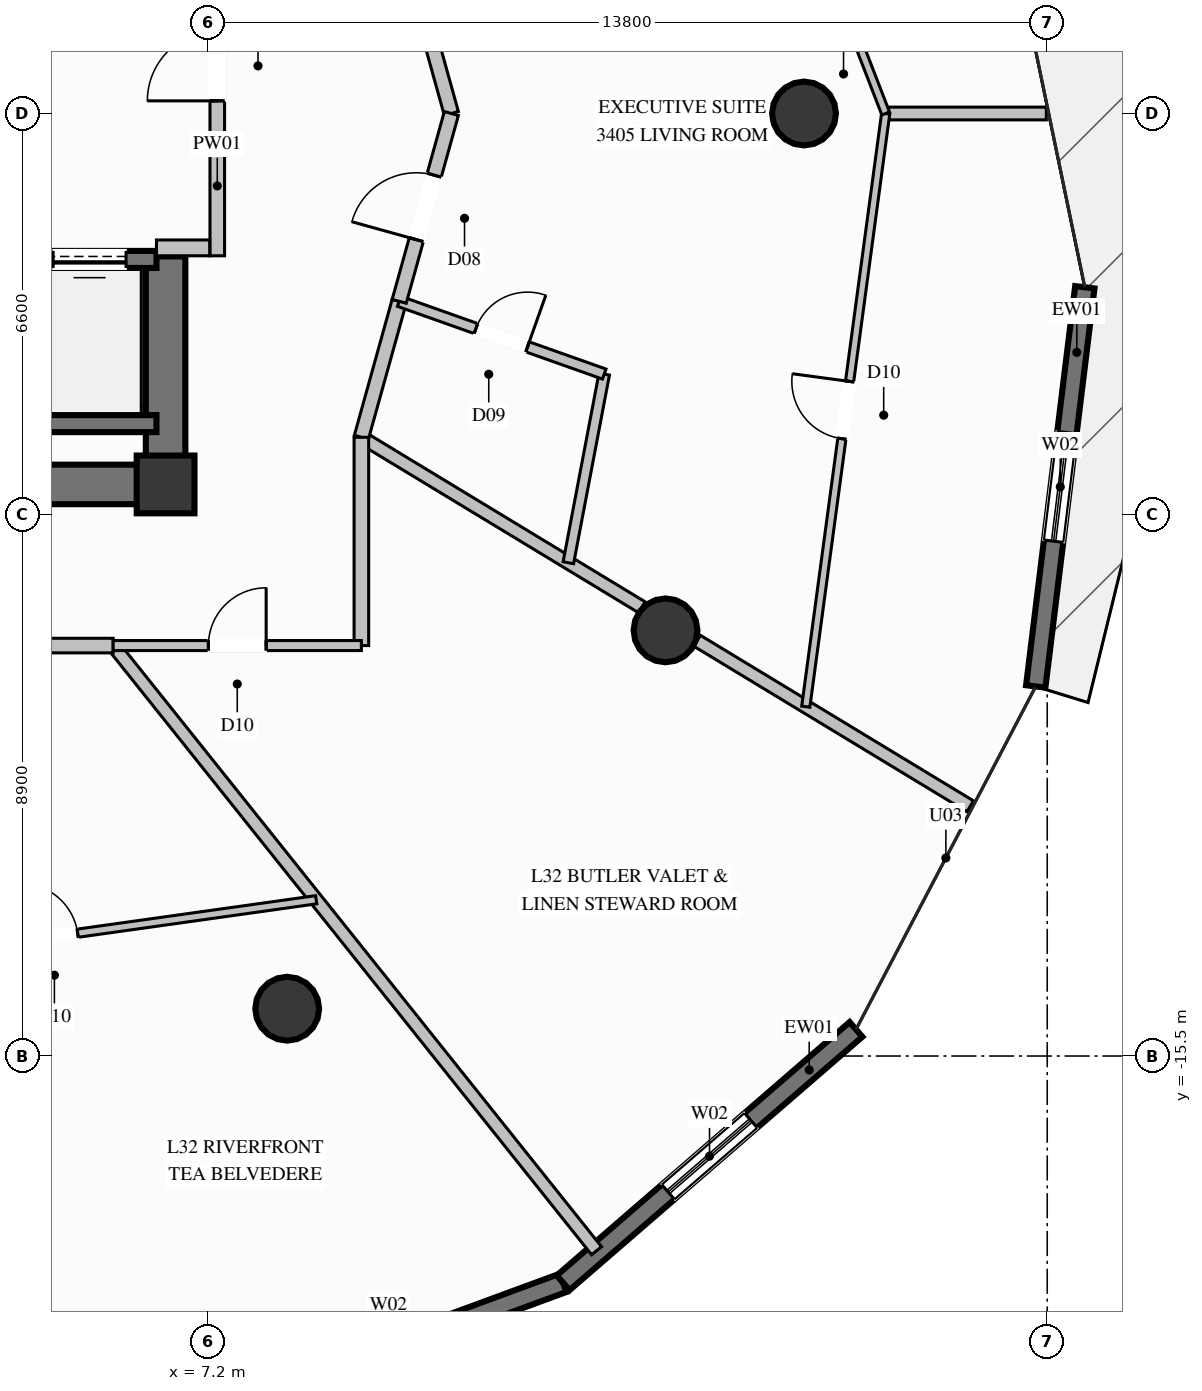
"""IFC4 building model, lengths in metres.
Left out: names, types, materials, properties, quantities, classifications, styles, units other than length and angle.
Written with IfcOpenShell. Run it as: python <this file> out.ifc"""

import sys

from ifc_helpers import new_model, si_unit, direction, frame, frame_2d, origin, origin_2d, place, context, subcontext, project, spatial, rectangle, circle, extrude, element, fill, save


model = new_model("IFC4")
c1 = context("Model", 3, precision=1e-05, world=origin(), true_north=direction((0.0, 1.0)))
c2 = subcontext(c1, "Body", "Model", "MODEL_VIEW")
j1 = project(units=[si_unit("LENGTHUNIT", "METRE"), si_unit("PLANEANGLEUNIT", "RADIAN")], contexts=[c1])
p1 = place(None, origin())
s1 = spatial("IfcSite", under=j1, at=p1, CompositionType="ELEMENT")
p2 = place(p1, origin())
s2 = spatial("IfcBuilding", under=s1, at=p2, CompositionType="ELEMENT")
p3 = place(p2, frame((0.0, 0.0, 127.8)))
s3 = spatial("IfcBuildingStorey", under=s2, at=p3, CompositionType="ELEMENT", Elevation=127.8)
p4 = place(p3, frame((6.5, -6.1, 0.0), z_axis=(0.0, 0.0, 1.0), x_axis=(1.0, 0.0, 0.0)))
e1 = element("IfcColumn", 1, at=p4, inside=s3, PredefinedType="COLUMN", context=c2, shape_type="SweptSolid", body=[
    extrude(rectangle(XDim=0.95, YDim=0.95, at=origin_2d()), origin(), (0.0, 0.0, 1.0), 3.6),
])
p5 = place(p3, frame((4.15, -6.1, 0.0), z_axis=(0.0, 0.0, 1.0), x_axis=(1.0, 0.0, 0.0)))
e2 = element("IfcWall", 2, at=p5, inside=s3, PredefinedType="SHEAR", context=c2, shape_type="SweptSolid", body=[
    extrude(rectangle(XDim=2.025, YDim=0.65, at=frame_2d((1.013, 0.0))), origin(), (0.0, 0.0, 1.0), 3.6),
])
p6 = place(p3, frame((6.5, -6.425, 0.0), z_axis=(0.0, 0.0, 1.0), x_axis=(0.0, 1.0, 0.0)))
e3 = element("IfcWall", 3, at=p6, inside=s3, PredefinedType="SHEAR", context=c2, shape_type="SweptSolid", body=[
    extrude(rectangle(XDim=4.075, YDim=0.65, at=frame_2d((2.038, 0.0))), origin(), (0.0, 0.0, 1.0), 3.6),
])
for number, where, z_axis, x_axis in (
    (4, (17.0, 0.0, 0.0), (0.0, 0.0, 1.0), (1.0, 0.0, 0.0)),
    (5, (8.5, -14.722, 0.0), (0.0, 0.0, 1.0), (1.0, 0.0, 0.0)),
    (6, (14.722, -8.5, 0.0), (0.0, 0.0, 1.0), (1.0, 0.0, 0.0)),
):
    element("IfcColumn", number, at=place(p3, frame(where, z_axis=z_axis, x_axis=x_axis)), inside=s3, PredefinedType="COLUMN", context=c2, shape_type="SweptSolid", body=[
        extrude(circle(Radius=0.525, at=origin_2d()), origin(), (0.0, 0.0, 1.0), 3.6),
    ])
p7 = place(p3, frame((21.618, -2.858, 0.0), z_axis=(0.0, 0.0, 1.0), x_axis=(-0.122003589953, -0.992529659022, 0.0)))
e7 = element("IfcWall", 7, at=p7, inside=s3, PredefinedType="SOLIDWALL", context=c2, shape_type="SweptSolid", body=[
    extrude(rectangle(XDim=6.614, YDim=0.32, at=frame_2d((3.307, 0.0))), origin(), (0.0, 0.0, 1.0), 3.35),
])
p8 = place(p7, frame((2.407, 0.0, 0.35)))
e8 = element("IfcOpeningElement", 8, at=p8, cuts=e7, PredefinedType="OPENING", context=c2, shape_type="SweptSolid", body=[
    extrude(rectangle(XDim=1.8, YDim=2.6, at=frame_2d((0.9, 1.3))), frame((0.0, 0.17, 0.0), z_axis=(0.0, -1.0, 0.0), x_axis=(1.0, 0.0, 0.0)), (0.0, 0.0, 1.0), 0.34),
])
p9 = place(p3, frame((13.038, -19.23, 0.0), z_axis=(0.0, 0.0, 1.0), x_axis=(-0.938465968801, -0.345371720619, 0.0)))
e9 = element("IfcWall", 9, at=p9, inside=s3, PredefinedType="SOLIDWALL", context=c2, shape_type="SweptSolid", body=[
    extrude(rectangle(XDim=6.613, YDim=0.32, at=frame_2d((3.307, 0.0))), origin(), (0.0, 0.0, 1.0), 3.35),
])
p10 = place(p9, frame((2.162, 0.0, 0.35)))
e10 = element("IfcOpeningElement", 10, at=p10, cuts=e9, PredefinedType="OPENING", context=c2, shape_type="SweptSolid", body=[
    extrude(rectangle(XDim=1.8, YDim=2.6, at=frame_2d((0.9, 1.3))), frame((0.0, 0.17, 0.0), z_axis=(0.0, -1.0, 0.0), x_axis=(1.0, 0.0, 0.0)), (0.0, 0.0, 1.0), 0.34),
])
p11 = place(p3, frame((17.855, -15.063, 0.0), z_axis=(0.0, 0.0, 1.0), x_axis=(-0.75628320377, -0.654244385299, 0.0)))
e11 = element("IfcWall", 11, at=p11, inside=s3, PredefinedType="SOLIDWALL", context=c2, shape_type="SweptSolid", body=[
    extrude(rectangle(XDim=6.369, YDim=0.32, at=frame_2d((3.185, 0.0))), origin(), (0.0, 0.0, 1.0), 3.35),
])
p12 = place(p11, frame((2.286, 0.0, 0.35)))
e12 = element("IfcOpeningElement", 12, at=p12, cuts=e11, PredefinedType="OPENING", context=c2, shape_type="SweptSolid", body=[
    extrude(rectangle(XDim=1.8, YDim=2.6, at=frame_2d((0.9, 1.3))), frame((0.0, 0.17, 0.0), z_axis=(0.0, -1.0, 0.0), x_axis=(1.0, 0.0, 0.0)), (0.0, 0.0, 1.0), 0.34),
])
p13 = place(p3, frame((4.15, -5.1, 0.0), z_axis=(0.0, 0.0, 1.0), x_axis=(1.0, 0.0, 0.0)))
e13 = element("IfcWall", 13, at=p13, inside=s3, PredefinedType="SOLIDWALL", context=c2, shape_type="SweptSolid", body=[
    extrude(rectangle(XDim=2.2, YDim=0.28, at=frame_2d((1.1, 0.0))), origin(), (0.0, 0.0, 1.0), 3.35),
])
p14 = place(p3, frame((6.35, -2.4, 0.0), z_axis=(0.0, 0.0, 1.0), x_axis=(-1.0, 0.0, 0.0)))
e14 = element("IfcWall", 14, at=p14, inside=s3, PredefinedType="SOLIDWALL", context=c2, shape_type="SweptSolid", body=[
    extrude(rectangle(XDim=2.2, YDim=0.28, at=frame_2d((1.1, 0.0))), origin(), (0.0, 0.0, 1.0), 3.35),
])
p15 = place(p14, frame((0.5, 0.0, 0.0)))
e15 = element("IfcOpeningElement", 15, at=p15, cuts=e14, PredefinedType="OPENING", context=c2, shape_type="SweptSolid", body=[
    extrude(rectangle(XDim=1.2, YDim=2.2, at=frame_2d((0.6, 1.1))), frame((0.0, 0.15, 0.0), z_axis=(0.0, -1.0, 0.0), x_axis=(1.0, 0.0, 0.0)), (0.0, 0.0, 1.0), 0.3),
])
p16 = place(p3, frame((7.35, -2.34, 0.0), z_axis=(0.0, 0.0, 1.0), x_axis=(0.0, 1.0, 0.0)))
e16 = element("IfcWall", 16, at=p16, inside=s3, PredefinedType="PARTITIONING", context=c2, shape_type="SweptSolid", body=[
    extrude(rectangle(XDim=5.07, YDim=0.24, at=frame_2d((2.535, 0.0))), origin(), (0.0, 0.0, 1.0), 2.435),
])
p17 = place(p16, frame((2.548, 0.0, 0.0)))
e17 = element("IfcOpeningElement", 17, at=p17, cuts=e16, PredefinedType="OPENING", context=c2, shape_type="SweptSolid", body=[
    extrude(rectangle(XDim=1.15, YDim=2.2, at=frame_2d((0.575, 1.1))), frame((0.0, 0.13, 0.0), z_axis=(0.0, -1.0, 0.0), x_axis=(1.0, 0.0, 0.0)), (0.0, 0.0, 1.0), 0.26),
])
p18 = place(p3, frame((6.35, -2.21, 0.0), z_axis=(0.0, 0.0, 1.0), x_axis=(1.0, 0.0, 0.0)))
e18 = element("IfcWall", 18, at=p18, inside=s3, PredefinedType="PARTITIONING", context=c2, shape_type="SweptSolid", body=[
    extrude(rectangle(XDim=0.875, YDim=0.26, at=frame_2d((0.438, 0.0))), origin(), (0.0, 0.0, 1.0), 3.35),
])
p19 = place(p3, frame((9.72, -5.325, 0.0), z_axis=(0.0, 0.0, 1.0), x_axis=(0.855199655735, -0.518298706183, 0.0)))
e19 = element("IfcWall", 19, at=p19, inside=s3, PredefinedType="PARTITIONING", context=c2, shape_type="SweptSolid", body=[
    extrude(rectangle(XDim=5.393, YDim=0.21, at=frame_2d((2.697, 0.0))), origin(), (0.0, 0.0, 1.0), 2.717),
])
p20 = place(p3, frame((15.24, -8.67, 0.0), z_axis=(0.0, 0.0, 1.0), x_axis=(0.855184099406, -0.51832437346, 0.0)))
e20 = element("IfcWall", 20, at=p20, inside=s3, PredefinedType="PARTITIONING", context=c2, shape_type="SweptSolid", body=[
    extrude(rectangle(XDim=5.254, YDim=0.21, at=frame_2d((2.627, 0.0))), origin(), (0.0, 0.0, 1.0), 3.35),
])
p21 = place(p3, frame((9.72, -5.325, 0.0), z_axis=(0.0, 0.0, 1.0), x_axis=(0.268045342481, 0.963406297662, 0.0)))
e21 = element("IfcWall", 21, at=p21, inside=s3, PredefinedType="PARTITIONING", context=c2, shape_type="SweptSolid", body=[
    extrude(rectangle(XDim=2.321, YDim=0.24, at=frame_2d((1.16, 0.0))), origin(), (0.0, 0.0, 1.0), 3.35),
])
p22 = place(p3, frame((13.124, -7.388, 0.0), z_axis=(0.0, 0.0, 1.0), x_axis=(0.186817303431, 0.982394673814, 0.0)))
e22 = element("IfcWall", 22, at=p22, inside=s3, PredefinedType="PLUMBINGWALL", context=c2, shape_type="SweptSolid", body=[
    extrude(rectangle(XDim=3.159, YDim=0.175, at=frame_2d((1.579, 0.0))), origin(), (0.0, 0.0, 1.0), 3.35),
])
p23 = place(p3, frame((10.342, -3.089, 0.0), z_axis=(0.0, 0.0, 1.0), x_axis=(0.942492937655, -0.334226064917, 0.0)))
e23 = element("IfcWall", 23, at=p23, inside=s3, PredefinedType="PLUMBINGWALL", context=c2, shape_type="SweptSolid", body=[
    extrude(rectangle(XDim=3.578, YDim=0.175, at=frame_2d((1.789, 0.0))), origin(), (0.0, 0.0, 1.0), 3.35),
])
p24 = place(p23, frame((1.339, 0.0, 0.0)))
e24 = element("IfcOpeningElement", 24, at=p24, cuts=e23, PredefinedType="OPENING", context=c2, shape_type="SweptSolid", body=[
    extrude(rectangle(XDim=0.9, YDim=2.1, at=frame_2d((0.45, 1.05))), frame((0.0, 0.098, 0.0), z_axis=(0.0, -1.0, 0.0), x_axis=(1.0, 0.0, 0.0)), (0.0, 0.0, 1.0), 0.195),
])
p25 = place(p3, frame((18.343, 0.0, 0.0), z_axis=(0.0, 0.0, 1.0), x_axis=(1.0, 0.0, 0.0)))
e25 = element("IfcWall", 25, at=p25, inside=s3, PredefinedType="PARTITIONING", context=c2, shape_type="SweptSolid", body=[
    extrude(rectangle(XDim=2.642, YDim=0.21, at=frame_2d((1.321, 0.0))), origin(), (0.0, 0.0, 1.0), 3.35),
])
p26 = place(p3, frame((11.2, 0.0, 0.0), z_axis=(0.0, 0.0, 1.0), x_axis=(-0.267782838254, 0.963479294815, 0.0)))
e26 = element("IfcWall", 26, at=p26, inside=s3, PredefinedType="PARTITIONING", context=c2, shape_type="SweptSolid", body=[
    extrude(rectangle(XDim=5.527, YDim=0.24, at=frame_2d((2.763, 0.0))), origin(), (0.0, 0.0, 1.0), 3.35),
])
p27 = place(p3, frame((10.342, -3.089, 0.0), z_axis=(0.0, 0.0, 1.0), x_axis=(0.267592805492, 0.963532091032, 0.0)))
e27 = element("IfcWall", 27, at=p27, inside=s3, PredefinedType="PARTITIONING", context=c2, shape_type="SweptSolid", body=[
    extrude(rectangle(XDim=3.206, YDim=0.24, at=frame_2d((1.603, 0.0))), origin(), (0.0, 0.0, 1.0), 3.35),
])
p28 = place(p27, frame((1.053, 0.0, 0.0)))
e28 = element("IfcOpeningElement", 28, at=p28, cuts=e27, PredefinedType="OPENING", context=c2, shape_type="SweptSolid", body=[
    extrude(rectangle(XDim=1.1, YDim=2.3, at=frame_2d((0.55, 1.15))), frame((0.0, 0.13, 0.0), z_axis=(0.0, -1.0, 0.0), x_axis=(1.0, 0.0, 0.0)), (0.0, 0.0, 1.0), 0.26),
])
p29 = place(p3, frame((17.029, -9.755, 0.0), z_axis=(0.0, 0.0, 1.0), x_axis=(0.133492593889, 0.991049810745, 0.0)))
e29 = element("IfcWall", 29, at=p29, inside=s3, PredefinedType="PARTITIONING", context=c2, shape_type="SweptSolid", body=[
    extrude(rectangle(XDim=9.843, YDim=0.135, at=frame_2d((4.921, 0.0))), origin(), (0.0, 0.0, 1.0), 3.35),
])
p30 = place(p29, frame((4.447, 0.0, 0.0)))
e30 = element("IfcOpeningElement", 30, at=p30, cuts=e29, PredefinedType="OPENING", context=c2, shape_type="SweptSolid", body=[
    extrude(rectangle(XDim=0.95, YDim=2.1, at=frame_2d((0.475, 1.05))), frame((0.0, 0.078, 0.0), z_axis=(0.0, -1.0, 0.0), x_axis=(1.0, 0.0, 0.0)), (0.0, 0.0, 1.0), 0.155),
])
p31 = place(p3, frame((18.343, 0.0, 0.0), z_axis=(0.0, 0.0, 1.0), x_axis=(-0.360296062326, 0.932838007091, 0.0)))
e31 = element("IfcWall", 31, at=p31, inside=s3, PredefinedType="PARTITIONING", context=c2, shape_type="SweptSolid", body=[
    extrude(rectangle(XDim=9.215, YDim=0.135, at=frame_2d((4.607, 0.0))), origin(), (0.0, 0.0, 1.0), 2.879),
])
p32 = place(p31, frame((4.132, 0.0, 0.0)))
e32 = element("IfcOpeningElement", 32, at=p32, cuts=e31, PredefinedType="OPENING", context=c2, shape_type="SweptSolid", body=[
    extrude(rectangle(XDim=0.95, YDim=2.1, at=frame_2d((0.475, 1.05))), frame((0.0, 0.078, 0.0), z_axis=(0.0, -1.0, 0.0), x_axis=(1.0, 0.0, 0.0)), (0.0, 0.0, 1.0), 0.155),
])
p33 = place(p3, frame((5.638, -8.75, 0.0), z_axis=(0.0, 0.0, 1.0), x_axis=(0.624140912071, -0.781311795558, 0.0)))
e33 = element("IfcWall", 33, at=p33, inside=s3, PredefinedType="PARTITIONING", context=c2, shape_type="SweptSolid", body=[
    extrude(rectangle(XDim=12.738, YDim=0.21, at=frame_2d((6.369, 0.0))), origin(), (0.0, 0.0, 1.0), 3.35),
])
p34 = place(p3, frame((0.0, -8.75, 0.0), z_axis=(0.0, 0.0, 1.0), x_axis=(1.0, 0.0, 0.0)))
e34 = element("IfcWall", 34, at=p34, inside=s3, PredefinedType="PARTITIONING", context=c2, shape_type="SweptSolid", body=[
    extrude(rectangle(XDim=5.638, YDim=0.24, at=frame_2d((2.819, 0.0))), origin(), (0.0, 0.0, 1.0), 3.35),
])
p35 = place(p3, frame((0.19, -14.163, 0.0), z_axis=(0.0, 0.0, 1.0), x_axis=(0.990295903808, 0.138974900259, 0.0)))
e35 = element("IfcWall", 35, at=p35, inside=s3, PredefinedType="PARTITIONING", context=c2, shape_type="SweptSolid", body=[
    extrude(rectangle(XDim=8.873, YDim=0.135, at=frame_2d((4.437, 0.0))), origin(), (0.0, 0.0, 1.0), 3.35),
])
p36 = place(p35, frame((3.962, 0.0, 0.0)))
e36 = element("IfcOpeningElement", 36, at=p36, cuts=e35, PredefinedType="OPENING", context=c2, shape_type="SweptSolid", body=[
    extrude(rectangle(XDim=0.95, YDim=2.1, at=frame_2d((0.475, 1.05))), frame((0.0, 0.078, 0.0), z_axis=(0.0, -1.0, 0.0), x_axis=(1.0, 0.0, 0.0)), (0.0, 0.0, 1.0), 0.155),
])
p37 = place(p3, frame((9.72, -8.75, 0.0), z_axis=(0.0, 0.0, 1.0), x_axis=(0.0, 1.0, 0.0)))
e37 = element("IfcWall", 37, at=p37, inside=s3, PredefinedType="PARTITIONING", context=c2, shape_type="SweptSolid", body=[
    extrude(rectangle(XDim=3.425, YDim=0.24, at=frame_2d((1.712, 0.0))), origin(), (0.0, 0.0, 1.0), 3.35),
])
p38 = place(p3, frame((5.638, -8.75, 0.0), z_axis=(0.0, 0.0, 1.0), x_axis=(1.0, 0.0, 0.0)))
e38 = element("IfcWall", 38, at=p38, inside=s3, PredefinedType="PARTITIONING", context=c2, shape_type="SweptSolid", body=[
    extrude(rectangle(XDim=4.082, YDim=0.165, at=frame_2d((2.041, 0.0))), origin(), (0.0, 0.0, 1.0), 3.35),
])
p39 = place(p38, frame((1.566, 0.0, 0.0)))
e39 = element("IfcOpeningElement", 39, at=p39, cuts=e38, PredefinedType="OPENING", context=c2, shape_type="SweptSolid", body=[
    extrude(rectangle(XDim=0.95, YDim=2.1, at=frame_2d((0.475, 1.05))), frame((0.0, 0.093, 0.0), z_axis=(0.0, -1.0, 0.0), x_axis=(1.0, 0.0, 0.0)), (0.0, 0.0, 1.0), 0.185),
])
p40 = place(p8, origin())
e40 = element("IfcWindow", 40, at=p40, inside=s3, PartitioningType="SINGLE_PANEL", PredefinedType="WINDOW", context=c2, shape_type="SweptSolid", body=[
    extrude(rectangle(XDim=1.8, YDim=2.6, at=frame_2d((0.9, 1.3))), frame((0.0, 0.03, 0.0), z_axis=(0.0, -1.0, 0.0), x_axis=(1.0, 0.0, 0.0)), (0.0, 0.0, 1.0), 0.06),
])
fill(e8, e40)
p41 = place(p12, origin())
e41 = element("IfcWindow", 41, at=p41, inside=s3, PartitioningType="SINGLE_PANEL", PredefinedType="WINDOW", context=c2, shape_type="SweptSolid", body=[
    extrude(rectangle(XDim=1.8, YDim=2.6, at=frame_2d((0.9, 1.3))), frame((0.0, 0.03, 0.0), z_axis=(0.0, -1.0, 0.0), x_axis=(1.0, 0.0, 0.0)), (0.0, 0.0, 1.0), 0.06),
])
fill(e12, e41)
p42 = place(p15, origin())
e42 = element("IfcDoor", 42, at=p42, inside=s3, OperationType="SLIDING_TO_LEFT", PredefinedType="DOOR", context=c2, shape_type="SweptSolid", body=[
    extrude(rectangle(XDim=1.2, YDim=2.2, at=frame_2d((0.6, 1.1))), frame((0.0, 0.025, 0.0), z_axis=(0.0, -1.0, 0.0), x_axis=(1.0, 0.0, 0.0)), (0.0, 0.0, 1.0), 0.05),
])
fill(e15, e42)
p43 = place(p17, origin())
e43 = element("IfcDoor", 43, at=p43, inside=s3, OperationType="SINGLE_SWING_LEFT", PredefinedType="DOOR", context=c2, shape_type="SweptSolid", body=[
    extrude(rectangle(XDim=1.15, YDim=2.2, at=frame_2d((0.575, 1.1))), frame((0.0, 0.025, 0.0), z_axis=(0.0, -1.0, 0.0), x_axis=(1.0, 0.0, 0.0)), (0.0, 0.0, 1.0), 0.05),
])
fill(e17, e43)
p44 = place(p24, origin())
e44 = element("IfcDoor", 44, at=p44, inside=s3, OperationType="SINGLE_SWING_RIGHT", PredefinedType="DOOR", context=c2, shape_type="SweptSolid", body=[
    extrude(rectangle(XDim=0.9, YDim=2.1, at=frame_2d((0.45, 1.05))), frame((0.0, 0.025, 0.0), z_axis=(0.0, -1.0, 0.0), x_axis=(1.0, 0.0, 0.0)), (0.0, 0.0, 1.0), 0.05),
])
fill(e24, e44)
p45 = place(p28, origin())
e45 = element("IfcDoor", 45, at=p45, inside=s3, OperationType="SINGLE_SWING_LEFT", PredefinedType="DOOR", context=c2, shape_type="SweptSolid", body=[
    extrude(rectangle(XDim=1.1, YDim=2.3, at=frame_2d((0.55, 1.15))), frame((0.0, 0.025, 0.0), z_axis=(0.0, -1.0, 0.0), x_axis=(1.0, 0.0, 0.0)), (0.0, 0.0, 1.0), 0.05),
])
fill(e28, e45)
p46 = place(p30, origin())
e46 = element("IfcDoor", 46, at=p46, inside=s3, OperationType="SINGLE_SWING_RIGHT", PredefinedType="DOOR", context=c2, shape_type="SweptSolid", body=[
    extrude(rectangle(XDim=0.95, YDim=2.1, at=frame_2d((0.475, 1.05))), frame((0.0, 0.025, 0.0), z_axis=(0.0, -1.0, 0.0), x_axis=(1.0, 0.0, 0.0)), (0.0, 0.0, 1.0), 0.05),
])
fill(e30, e46)
p47 = place(p36, origin())
e47 = element("IfcDoor", 47, at=p47, inside=s3, OperationType="SINGLE_SWING_LEFT", PredefinedType="DOOR", context=c2, shape_type="SweptSolid", body=[
    extrude(rectangle(XDim=0.95, YDim=2.1, at=frame_2d((0.475, 1.05))), frame((0.0, 0.025, 0.0), z_axis=(0.0, -1.0, 0.0), x_axis=(1.0, 0.0, 0.0)), (0.0, 0.0, 1.0), 0.05),
])
fill(e36, e47)
p48 = place(p39, origin())
e48 = element("IfcDoor", 48, at=p48, inside=s3, OperationType="SINGLE_SWING_RIGHT", PredefinedType="DOOR", context=c2, shape_type="SweptSolid", body=[
    extrude(rectangle(XDim=0.95, YDim=2.1, at=frame_2d((0.475, 1.05))), frame((0.0, 0.025, 0.0), z_axis=(0.0, -1.0, 0.0), x_axis=(1.0, 0.0, 0.0)), (0.0, 0.0, 1.0), 0.05),
])
fill(e39, e48)
save(model, sys.argv[1])
